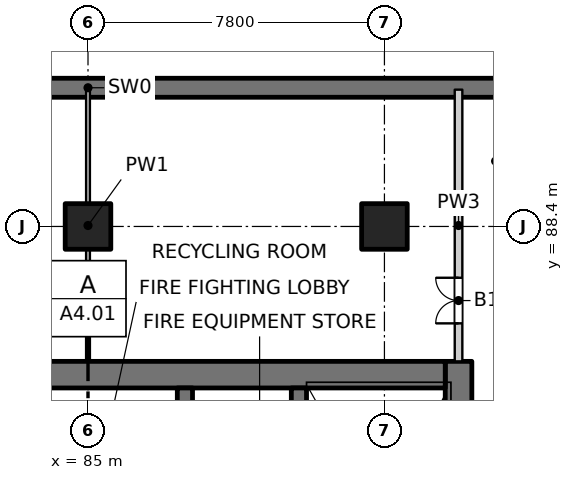
"""IFC4 building model, lengths in metres.
Left out: names, types, materials, properties, quantities, classifications, styles, units other than length and angle.
Written with IfcOpenShell. Run it as: python <this file> out.ifc"""

import sys

from ifc_helpers import new_model, si_unit, direction, frame, frame_2d, origin, origin_2d, place, context, subcontext, project, spatial, rectangle, extrude, element, fill, save


model = new_model("IFC4")
c1 = context("Model", 3, precision=1e-05, world=origin(), true_north=direction((0.0, 1.0)))
c2 = subcontext(c1, "Body", "Model", "MODEL_VIEW")
j1 = project(units=[si_unit("LENGTHUNIT", "METRE"), si_unit("PLANEANGLEUNIT", "RADIAN")], contexts=[c1])
p1 = place(None, origin())
s1 = spatial("IfcSite", under=j1, at=p1, CompositionType="ELEMENT")
p2 = place(p1, origin())
s2 = spatial("IfcBuilding", under=s1, at=p2, CompositionType="ELEMENT")
p3 = place(p2, frame((0.0, 0.0, -4.5)))
s3 = spatial("IfcBuildingStorey", under=s2, at=p3, CompositionType="ELEMENT", Elevation=-4.5)
p4 = place(p3, frame((42.6, 92.05, -0.35), z_axis=(0.0, 0.0, 1.0), x_axis=(1.0, 0.0, 0.0)))
e1 = element("IfcWall", 1, at=p4, inside=s3, PredefinedType="SOLIDWALL", context=c2, shape_type="SweptSolid", body=[
    extrude(rectangle(XDim=84.8, YDim=0.5, at=frame_2d((42.4, 0.0))), origin(), (0.0, 0.0, 1.0), 4.45),
])
for number, where, z_axis, x_axis in (
    (2, (85.0, 88.4, -0.35), (0.0, 0.0, 1.0), (1.0, 0.0, 0.0)),
    (3, (92.8, 88.4, -0.35), (0.0, 0.0, 1.0), (1.0, 0.0, 0.0)),
):
    element("IfcColumn", number, at=place(p3, frame(where, z_axis=z_axis, x_axis=x_axis)), inside=s3, PredefinedType="COLUMN", context=c2, shape_type="SweptSolid", body=[
        extrude(rectangle(XDim=1.2, YDim=1.2, at=origin_2d()), origin(), (0.0, 0.0, 1.0), 4.45),
    ])
p5 = place(p3, frame((94.75, 77.3, -0.35), z_axis=(0.0, 0.0, 1.0), x_axis=(0.0, 1.0, 0.0)))
e4 = element("IfcWall", 4, at=p5, inside=s3, PredefinedType="SOLIDWALL", context=c2, shape_type="SweptSolid", body=[
    extrude(rectangle(XDim=7.55, YDim=0.7, at=frame_2d((3.775, 0.0))), origin(), (0.0, 0.0, 1.0), 4.45),
])
p6 = place(p5, frame((0.3, 0.0, 0.35)))
e5 = element("IfcOpeningElement", 5, at=p6, cuts=e4, PredefinedType="OPENING", context=c2, shape_type="SweptSolid", body=[
    extrude(rectangle(XDim=1.2, YDim=2.1, at=frame_2d((0.6, 1.05))), frame((0.0, 0.36, 0.0), z_axis=(0.0, -1.0, 0.0), x_axis=(1.0, 0.0, 0.0)), (0.0, 0.0, 1.0), 0.72),
])
p7 = place(p3, frame((75.6, 84.5, -0.35), z_axis=(0.0, 0.0, 1.0), x_axis=(1.0, 0.0, 0.0)))
e6 = element("IfcWall", 6, at=p7, inside=s3, PredefinedType="SOLIDWALL", context=c2, shape_type="SweptSolid", body=[
    extrude(rectangle(XDim=18.8, YDim=0.7, at=frame_2d((9.4, 0.0))), origin(), (0.0, 0.0, 1.0), 4.45),
])
p8 = place(p3, frame((90.55, 77.3, -0.35), z_axis=(0.0, 0.0, 1.0), x_axis=(0.0, 1.0, 0.0)))
e7 = element("IfcWall", 7, at=p8, inside=s3, PredefinedType="SOLIDWALL", context=c2, shape_type="SweptSolid", body=[
    extrude(rectangle(XDim=6.85, YDim=0.4, at=frame_2d((3.425, 0.0))), origin(), (0.0, 0.0, 1.0), 4.45),
])
p9 = place(p3, frame((87.55, 82.1, -0.35), z_axis=(0.0, 0.0, 1.0), x_axis=(0.0, 1.0, 0.0)))
e8 = element("IfcWall", 8, at=p9, inside=s3, PredefinedType="SOLIDWALL", context=c2, shape_type="SweptSolid", body=[
    extrude(rectangle(XDim=2.05, YDim=0.4, at=frame_2d((1.025, 0.0))), origin(), (0.0, 0.0, 1.0), 4.45),
])
p10 = place(p9, frame((0.65, 0.0, 0.35)))
e9 = element("IfcOpeningElement", 9, at=p10, cuts=e8, PredefinedType="OPENING", context=c2, shape_type="SweptSolid", body=[
    extrude(rectangle(XDim=0.9, YDim=2.1, at=frame_2d((0.45, 1.05))), frame((0.0, 0.21, 0.0), z_axis=(0.0, -1.0, 0.0), x_axis=(1.0, 0.0, 0.0)), (0.0, 0.0, 1.0), 0.42),
])
p11 = place(p3, frame((85.0, 84.85, 0.0), z_axis=(0.0, 0.0, 1.0), x_axis=(0.0, 1.0, 0.0)))
e10 = element("IfcWall", 10, at=p11, inside=s3, PredefinedType="PARTITIONING", context=c2, shape_type="SweptSolid", body=[
    extrude(rectangle(XDim=7.15, YDim=0.1, at=frame_2d((3.575, 0.0))), origin(), (0.0, 0.0, 1.0), 4.1),
])
p12 = place(p3, frame((94.75, 84.85, 0.0), z_axis=(0.0, 0.0, 1.0), x_axis=(0.0, 1.0, 0.0)))
e11 = element("IfcWall", 11, at=p12, inside=s3, PredefinedType="PARTITIONING", context=c2, shape_type="SweptSolid", body=[
    extrude(rectangle(XDim=7.15, YDim=0.2, at=frame_2d((3.575, 0.0))), origin(), (0.0, 0.0, 1.0), 4.1),
])
p13 = place(p12, frame((1.0, 0.0, 0.0)))
e12 = element("IfcOpeningElement", 12, at=p13, cuts=e11, PredefinedType="OPENING", context=c2, shape_type="SweptSolid", body=[
    extrude(rectangle(XDim=1.2, YDim=2.1, at=frame_2d((0.6, 1.05))), frame((0.0, 0.11, 0.0), z_axis=(0.0, -1.0, 0.0), x_axis=(1.0, 0.0, 0.0)), (0.0, 0.0, 1.0), 0.22),
])
p14 = place(p13, origin())
e13 = element("IfcDoor", 13, at=p14, inside=s3, OperationType="DOUBLE_DOOR_SINGLE_SWING", PredefinedType="DOOR", context=c2, shape_type="SweptSolid", body=[
    extrude(rectangle(XDim=1.2, YDim=2.1, at=frame_2d((0.6, 1.05))), frame((0.0, 0.025, 0.0), z_axis=(0.0, -1.0, 0.0), x_axis=(1.0, 0.0, 0.0)), (0.0, 0.0, 1.0), 0.05),
])
fill(e12, e13)
save(model, sys.argv[1])
